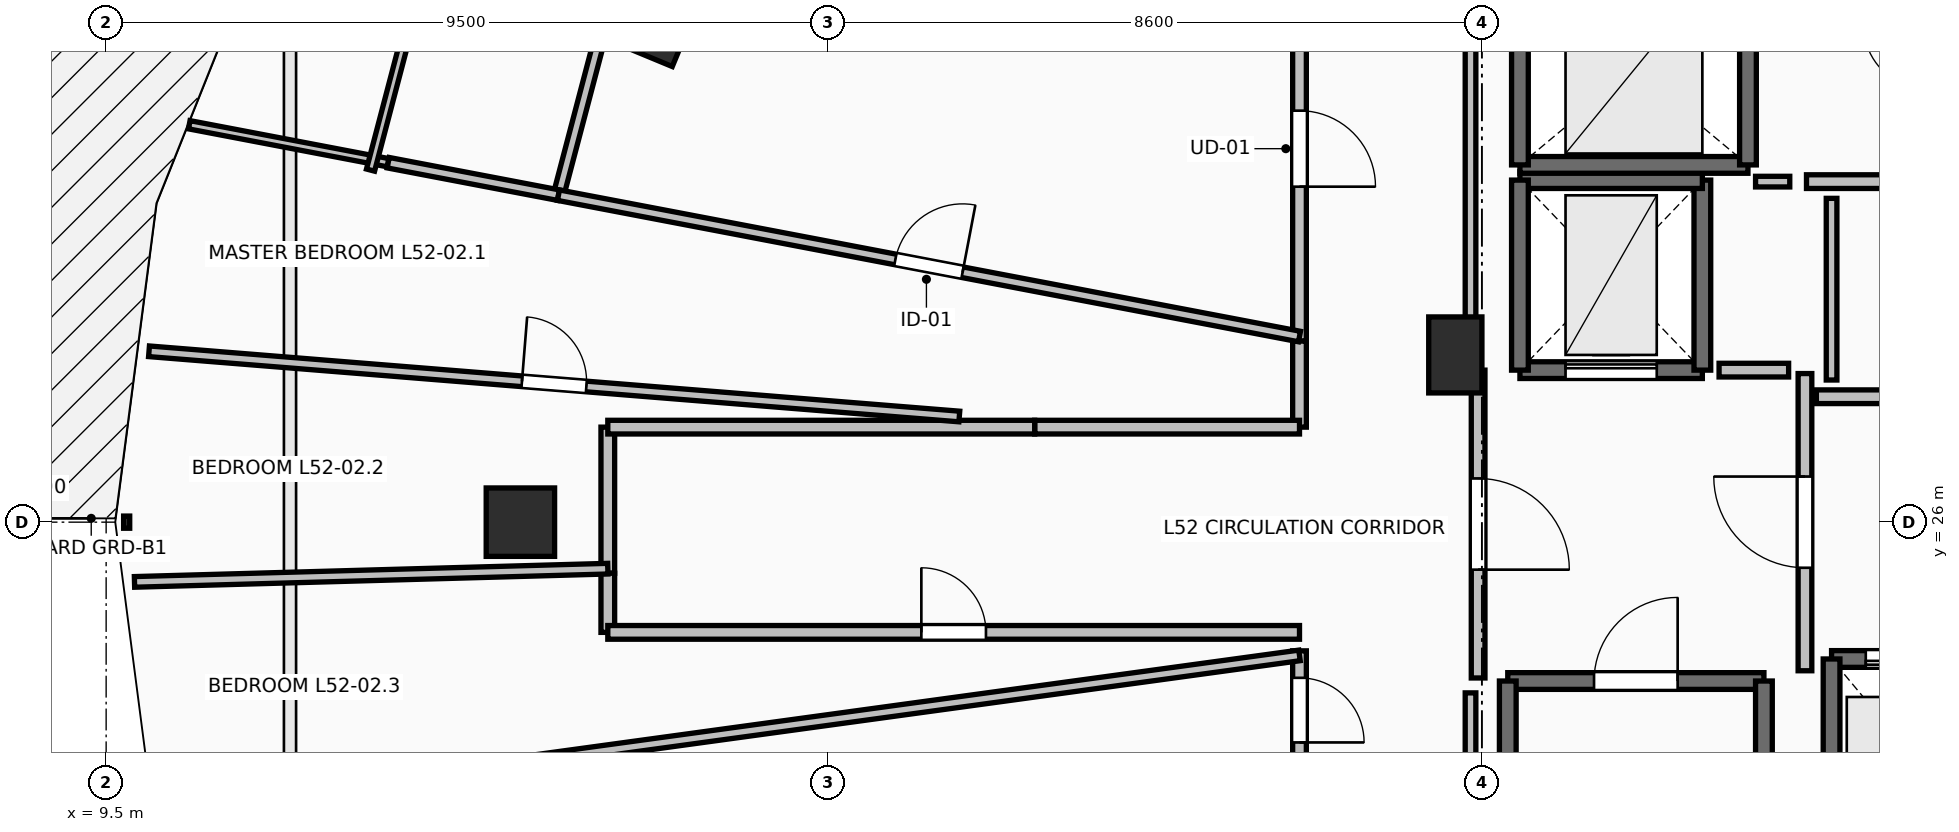
"""IFC4 building model, lengths in metres.
Left out: names, types, materials, properties, quantities, classifications, styles, units other than length and angle.
Written with IfcOpenShell. Run it as: python <this file> out.ifc"""

import sys

from ifc_helpers import new_model, si_unit, direction, frame, frame_2d, origin, origin_2d, place, context, subcontext, project, spatial, rectangle, extrude, element, fill, save


model = new_model("IFC4")
c1 = context("Model", 3, precision=1e-05, world=origin(), true_north=direction((0.0, 1.0)))
c2 = subcontext(c1, "Body", "Model", "MODEL_VIEW")
j1 = project(units=[si_unit("LENGTHUNIT", "METRE"), si_unit("PLANEANGLEUNIT", "RADIAN")], contexts=[c1])
p1 = place(None, origin())
s1 = spatial("IfcSite", under=j1, at=p1, CompositionType="ELEMENT")
p2 = place(p1, origin())
s2 = spatial("IfcBuilding", under=s1, at=p2, CompositionType="ELEMENT")
p3 = place(p2, frame((0.0, 0.0, 193.1)))
s3 = spatial("IfcBuildingStorey", under=s2, at=p3, CompositionType="ELEMENT", Elevation=193.1)
for number, where, z_axis, x_axis in (
    (1, (16.705, 32.582, 0.0), (0.0, 0.0, 1.0), (-0.924, 0.383, 0.0)),
    (2, (14.95, 26.0, 0.0), (0.0, 0.0, 1.0), (-1.0, 0.0, 0.0)),
):
    element("IfcColumn", number, at=place(p3, frame(where, z_axis=z_axis, x_axis=x_axis)), inside=s3, PredefinedType="COLUMN", context=c2, shape_type="SweptSolid", body=[
        extrude(rectangle(XDim=0.9, YDim=0.9, at=origin_2d()), origin(), (0.0, 0.0, 1.0), 3.5),
    ])
p4 = place(p3, frame((27.25, 28.2, 0.0), z_axis=(0.0, 0.0, 1.0), x_axis=(1.0, 0.0, 0.0)))
e3 = element("IfcColumn", 3, at=p4, inside=s3, PredefinedType="PILASTER", context=c2, shape_type="SweptSolid", body=[
    extrude(rectangle(XDim=0.7, YDim=1.0, at=origin_2d()), origin(), (0.0, 0.0, 1.0), 3.5),
])
p5 = place(p3, frame((27.94, 23.91, 0.0), z_axis=(0.0, 0.0, 1.0), x_axis=(1.0, 0.0, 0.0)))
e4 = element("IfcWall", 4, at=p5, inside=s3, PredefinedType="SOLIDWALL", context=c2, shape_type="SweptSolid", body=[
    extrude(rectangle(XDim=3.37, YDim=0.22, at=frame_2d((1.685, 0.0))), origin(), (0.0, 0.0, 1.0), 3.24),
])
p6 = place(p5, frame((1.135, 0.0, 0.0)))
e5 = element("IfcOpeningElement", 5, at=p6, cuts=e4, PredefinedType="OPENING", context=c2, shape_type="SweptSolid", body=[
    extrude(rectangle(XDim=1.1, YDim=2.15, at=frame_2d((0.55, 1.075))), frame((0.0, 0.125, 0.0), z_axis=(0.0, -1.0, 0.0), x_axis=(1.0, 0.0, 0.0)), (0.0, 0.0, 1.0), 0.25),
])
for number, where, z_axis, x_axis in (
    (6, (31.31, 23.91, 0.0), (0.0, 0.0, 1.0), (0.0, -1.0, 0.0)),
    (7, (27.94, 16.49, 0.0), (0.0, 0.0, 1.0), (0.0, 1.0, 0.0)),
):
    element("IfcWall", number, at=place(p3, frame(where, z_axis=z_axis, x_axis=x_axis)), inside=s3, PredefinedType="SOLIDWALL", context=c2, shape_type="SweptSolid", body=[
        extrude(rectangle(XDim=7.42, YDim=0.22, at=frame_2d((3.71, 0.0))), origin(), (0.0, 0.0, 1.0), 3.24),
    ])
p7 = place(p3, frame((34.2, 24.2, 0.0), z_axis=(0.0, 0.0, 1.0), x_axis=(-1.0, 0.0, 0.0)))
e8 = element("IfcWall", 8, at=p7, inside=s3, PredefinedType="SOLIDWALL", context=c2, shape_type="SweptSolid", body=[
    extrude(rectangle(XDim=2.0, YDim=0.22, at=frame_2d((1.0, 0.0))), origin(), (0.0, 0.0, 1.0), 3.24),
])
p8 = place(p7, frame((0.45, 0.0, 0.0)))
e9 = element("IfcOpeningElement", 9, at=p8, cuts=e8, PredefinedType="OPENING", context=c2, shape_type="SweptSolid", body=[
    extrude(rectangle(XDim=1.1, YDim=2.2, at=frame_2d((0.55, 1.1))), frame((0.0, 0.125, 0.0), z_axis=(0.0, -1.0, 0.0), x_axis=(1.0, 0.0, 0.0)), (0.0, 0.0, 1.0), 0.25),
])
p9 = place(p3, frame((32.2, 24.2, 0.0), z_axis=(0.0, 0.0, 1.0), x_axis=(0.0, -1.0, 0.0)))
e10 = element("IfcWall", 10, at=p9, inside=s3, PredefinedType="SOLIDWALL", context=c2, shape_type="SweptSolid", body=[
    extrude(rectangle(XDim=2.4, YDim=0.22, at=frame_2d((1.2, 0.0))), origin(), (0.0, 0.0, 1.0), 3.24),
])
p10 = place(p3, frame((28.1, 28.0, 0.0), z_axis=(0.0, 0.0, 1.0), x_axis=(1.0, 0.0, 0.0)))
e11 = element("IfcWall", 11, at=p10, inside=s3, PredefinedType="SHEAR", context=c2, shape_type="SweptSolid", body=[
    extrude(rectangle(XDim=2.4, YDim=0.22, at=frame_2d((1.2, 0.0))), origin(), (0.0, 0.0, 1.0), 3.24),
])
p11 = place(p10, frame((0.6, 0.0, 0.0)))
e12 = element("IfcOpeningElement", 12, at=p11, cuts=e11, PredefinedType="OPENING", context=c2, shape_type="SweptSolid", body=[
    extrude(rectangle(XDim=1.2, YDim=2.2, at=frame_2d((0.6, 1.1))), frame((0.0, 0.125, 0.0), z_axis=(0.0, -1.0, 0.0), x_axis=(1.0, 0.0, 0.0)), (0.0, 0.0, 1.0), 0.25),
])
p12 = place(p3, frame((30.5, 28.0, 0.0), z_axis=(0.0, 0.0, 1.0), x_axis=(0.0, 1.0, 0.0)))
e13 = element("IfcWall", 13, at=p12, inside=s3, PredefinedType="SHEAR", context=c2, shape_type="SweptSolid", body=[
    extrude(rectangle(XDim=2.5, YDim=0.22, at=frame_2d((1.25, 0.0))), origin(), (0.0, 0.0, 1.0), 3.24),
])
p13 = place(p3, frame((30.5, 30.5, 0.0), z_axis=(0.0, 0.0, 1.0), x_axis=(-1.0, 0.0, 0.0)))
e14 = element("IfcWall", 14, at=p13, inside=s3, PredefinedType="SHEAR", context=c2, shape_type="SweptSolid", body=[
    extrude(rectangle(XDim=2.4, YDim=0.22, at=frame_2d((1.2, 0.0))), origin(), (0.0, 0.0, 1.0), 3.24),
])
p14 = place(p3, frame((28.1, 30.5, 0.0), z_axis=(0.0, 0.0, 1.0), x_axis=(0.0, -1.0, 0.0)))
e15 = element("IfcWall", 15, at=p14, inside=s3, PredefinedType="SHEAR", context=c2, shape_type="SweptSolid", body=[
    extrude(rectangle(XDim=2.5, YDim=0.22, at=frame_2d((1.25, 0.0))), origin(), (0.0, 0.0, 1.0), 3.24),
])
p15 = place(p3, frame((28.1, 30.7, 0.0), z_axis=(0.0, 0.0, 1.0), x_axis=(1.0, 0.0, 0.0)))
e16 = element("IfcWall", 16, at=p15, inside=s3, PredefinedType="SOLIDWALL", context=c2, shape_type="SweptSolid", body=[
    extrude(rectangle(XDim=3.0, YDim=0.22, at=frame_2d((1.5, 0.0))), origin(), (0.0, 0.0, 1.0), 3.24),
])
for number, where, z_axis, x_axis in (
    (17, (31.1, 30.7, 0.0), (0.0, 0.0, 1.0), (0.0, 1.0, 0.0)),
    (18, (28.1, 33.2, 0.0), (0.0, 0.0, 1.0), (0.0, -1.0, 0.0)),
):
    element("IfcWall", number, at=place(p3, frame(where, z_axis=z_axis, x_axis=x_axis)), inside=s3, PredefinedType="SOLIDWALL", context=c2, shape_type="SweptSolid", body=[
        extrude(rectangle(XDim=2.5, YDim=0.22, at=frame_2d((1.25, 0.0))), origin(), (0.0, 0.0, 1.0), 3.24),
    ])
p16 = place(p3, frame((31.85, 24.045, 0.0), z_axis=(0.0, 0.0, 1.0), x_axis=(0.0, 1.0, 0.0)))
e19 = element("IfcWall", 19, at=p16, inside=s3, PredefinedType="PARTITIONING", context=c2, shape_type="SweptSolid", body=[
    extrude(rectangle(XDim=3.91, YDim=0.18, at=frame_2d((1.955, 0.0))), origin(), (0.0, 0.0, 1.0), 3.24),
])
p17 = place(p16, frame((1.355, 0.0, 0.0)))
e20 = element("IfcOpeningElement", 20, at=p17, cuts=e19, PredefinedType="OPENING", context=c2, shape_type="SweptSolid", body=[
    extrude(rectangle(XDim=1.2, YDim=2.15, at=frame_2d((0.6, 1.075))), frame((0.0, 0.105, 0.0), z_axis=(0.0, -1.0, 0.0), x_axis=(1.0, 0.0, 0.0)), (0.0, 0.0, 1.0), 0.21),
])
p18 = place(p3, frame((27.55, 28.0, 0.0), z_axis=(0.0, 0.0, 1.0), x_axis=(0.0, -1.0, 0.0)))
e21 = element("IfcWall", 21, at=p18, inside=s3, PredefinedType="PARTITIONING", context=c2, shape_type="SweptSolid", body=[
    extrude(rectangle(XDim=4.05, YDim=0.18, at=frame_2d((2.025, 0.0))), origin(), (0.0, 0.0, 1.0), 3.24),
])
p19 = place(p18, frame((1.425, 0.0, 0.0)))
e22 = element("IfcOpeningElement", 22, at=p19, cuts=e21, PredefinedType="OPENING", context=c2, shape_type="SweptSolid", body=[
    extrude(rectangle(XDim=1.2, YDim=2.15, at=frame_2d((0.6, 1.075))), frame((0.0, 0.105, 0.0), z_axis=(0.0, -1.0, 0.0), x_axis=(1.0, 0.0, 0.0)), (0.0, 0.0, 1.0), 0.21),
])
p20 = place(p3, frame((31.87, 30.48, 0.0), z_axis=(0.0, 0.0, 1.0), x_axis=(1.0, 0.0, 0.0)))
e23 = element("IfcWall", 23, at=p20, inside=s3, PredefinedType="PARTITIONING", context=c2, shape_type="SweptSolid", body=[
    extrude(rectangle(XDim=1.6, YDim=0.18, at=frame_2d((0.8, 0.0))), origin(), (0.0, 0.0, 1.0), 3.24),
])
p21 = place(p3, frame((39.19, 27.65, 0.0), z_axis=(0.0, 0.0, 1.0), x_axis=(-1.0, 0.0, 0.0)))
e24 = element("IfcWall", 24, at=p21, inside=s3, PredefinedType="PARTITIONING", context=c2, shape_type="SweptSolid", body=[
    extrude(rectangle(XDim=7.19, YDim=0.18, at=frame_2d((3.595, 0.0))), origin(), (0.0, 0.0, 1.0), 3.24),
])
p22 = place(p21, frame((3.095, 0.0, 0.0)))
e25 = element("IfcOpeningElement", 25, at=p22, cuts=e24, PredefinedType="OPENING", context=c2, shape_type="SweptSolid", body=[
    extrude(rectangle(XDim=1.0, YDim=2.15, at=frame_2d((0.5, 1.075))), frame((0.0, 0.105, 0.0), z_axis=(0.0, -1.0, 0.0), x_axis=(1.0, 0.0, 0.0)), (0.0, 0.0, 1.0), 0.21),
])
p23 = place(p3, frame((25.2, 33.445, 0.0), z_axis=(0.0, 0.0, 1.0), x_axis=(0.0, -1.0, 0.0)))
e26 = element("IfcWall", 26, at=p23, inside=s3, PredefinedType="PARTITIONING", context=c2, shape_type="SweptSolid", body=[
    extrude(rectangle(XDim=5.063, YDim=0.18, at=frame_2d((2.531, 0.0))), origin(), (0.0, 0.0, 1.0), 2.432),
])
p24 = place(p23, frame((2.031, 0.0, 0.0)))
e27 = element("IfcOpeningElement", 27, at=p24, cuts=e26, PredefinedType="OPENING", context=c2, shape_type="SweptSolid", body=[
    extrude(rectangle(XDim=1.0, YDim=2.15, at=frame_2d((0.5, 1.075))), frame((0.0, 0.105, 0.0), z_axis=(0.0, -1.0, 0.0), x_axis=(1.0, 0.0, 0.0)), (0.0, 0.0, 1.0), 0.21),
])
p25 = place(p3, frame((25.2, 28.382, 0.0), z_axis=(0.0, 0.0, 1.0), x_axis=(0.0, -1.0, 0.0)))
e28 = element("IfcWall", 28, at=p25, inside=s3, PredefinedType="PARTITIONING", context=c2, shape_type="SweptSolid", body=[
    extrude(rectangle(XDim=1.132, YDim=0.18, at=frame_2d((0.566, 0.0))), origin(), (0.0, 0.0, 1.0), 2.432),
])
p26 = place(p3, frame((25.2, 27.25, 0.0), z_axis=(0.0, 0.0, 1.0), x_axis=(-1.0, 0.0, 0.0)))
e29 = element("IfcWall", 29, at=p26, inside=s3, PredefinedType="PARTITIONING", context=c2, shape_type="SweptSolid", body=[
    extrude(rectangle(XDim=3.484, YDim=0.18, at=frame_2d((1.742, 0.0))), origin(), (0.0, 0.0, 1.0), 2.432),
])
p27 = place(p3, frame((16.1, 27.25, 0.0), z_axis=(0.0, 0.0, 1.0), x_axis=(0.0, -1.0, 0.0)))
e30 = element("IfcWall", 30, at=p27, inside=s3, PredefinedType="PARTITIONING", context=c2, shape_type="SweptSolid", body=[
    extrude(rectangle(XDim=1.922, YDim=0.18, at=frame_2d((0.961, 0.0))), origin(), (0.0, 0.0, 1.0), 2.432),
])
p28 = place(p3, frame((21.716, 27.25, 0.0), z_axis=(0.0, 0.0, 1.0), x_axis=(-1.0, 0.0, 0.0)))
e31 = element("IfcWall", 31, at=p28, inside=s3, PredefinedType="PARTITIONING", context=c2, shape_type="SweptSolid", body=[
    extrude(rectangle(XDim=5.616, YDim=0.18, at=frame_2d((2.808, 0.0))), origin(), (0.0, 0.0, 1.0), 2.432),
])
p29 = place(p3, frame((16.1, 25.328, 0.0), z_axis=(0.0, 0.0, 1.0), x_axis=(0.0, -1.0, 0.0)))
e32 = element("IfcWall", 32, at=p29, inside=s3, PredefinedType="PARTITIONING", context=c2, shape_type="SweptSolid", body=[
    extrude(rectangle(XDim=0.778, YDim=0.18, at=frame_2d((0.389, 0.0))), origin(), (0.0, 0.0, 1.0), 3.24),
])
p30 = place(p3, frame((16.1, 24.55, 0.0), z_axis=(0.0, 0.0, 1.0), x_axis=(1.0, 0.0, 0.0)))
e33 = element("IfcWall", 33, at=p30, inside=s3, PredefinedType="PARTITIONING", context=c2, shape_type="SweptSolid", body=[
    extrude(rectangle(XDim=9.1, YDim=0.18, at=frame_2d((4.55, 0.0))), origin(), (0.0, 0.0, 1.0), 2.922),
])
p31 = place(p30, frame((4.125, 0.0, 0.0)))
e34 = element("IfcOpeningElement", 34, at=p31, cuts=e33, PredefinedType="OPENING", context=c2, shape_type="SweptSolid", body=[
    extrude(rectangle(XDim=0.85, YDim=2.1, at=frame_2d((0.425, 1.05))), frame((0.0, 0.105, 0.0), z_axis=(0.0, -1.0, 0.0), x_axis=(1.0, 0.0, 0.0)), (0.0, 0.0, 1.0), 0.21),
])
p32 = place(p3, frame((25.2, 24.307, 0.0), z_axis=(0.0, 0.0, 1.0), x_axis=(0.0, -1.0, 0.0)))
e35 = element("IfcWall", 35, at=p32, inside=s3, PredefinedType="PARTITIONING", context=c2, shape_type="SweptSolid", body=[
    extrude(rectangle(XDim=1.56, YDim=0.18, at=frame_2d((0.78, 0.0))), origin(), (0.0, 0.0, 1.0), 3.24),
])
p33 = place(p32, frame((0.355, 0.0, 0.0)))
e36 = element("IfcOpeningElement", 36, at=p33, cuts=e35, PredefinedType="OPENING", context=c2, shape_type="SweptSolid", body=[
    extrude(rectangle(XDim=0.85, YDim=2.1, at=frame_2d((0.425, 1.05))), frame((0.0, 0.105, 0.0), z_axis=(0.0, -1.0, 0.0), x_axis=(1.0, 0.0, 0.0)), (0.0, 0.0, 1.0), 0.21),
])
p34 = place(p3, frame((13.21, 30.729, 0.0), z_axis=(0.0, 0.0, 1.0), x_axis=(-0.982266305937, 0.187491077708, 0.0)))
e37 = element("IfcWall", 37, at=p34, inside=s3, PredefinedType="PARTITIONING", context=c2, shape_type="SweptSolid", body=[
    extrude(rectangle(XDim=2.664, YDim=0.11, at=frame_2d((1.332, 0.0))), origin(), (0.0, 0.0, 1.0), 3.24),
])
p35 = place(p3, frame((16.123, 32.853, 0.0), z_axis=(0.0, 0.0, 1.0), x_axis=(-0.254775717765, -0.967000172512, 0.0)))
e38 = element("IfcWall", 38, at=p35, inside=s3, PredefinedType="PARTITIONING", context=c2, shape_type="SweptSolid", body=[
    extrude(rectangle(XDim=2.638, YDim=0.14, at=frame_2d((1.319, 0.0))), origin(), (0.0, 0.0, 1.0), 3.24),
])
p36 = place(p3, frame((15.451, 30.302, 0.0), z_axis=(0.0, 0.0, 1.0), x_axis=(-0.982295439063, 0.187338384738, 0.0)))
e39 = element("IfcWall", 39, at=p36, inside=s3, PredefinedType="PARTITIONING", context=c2, shape_type="SweptSolid", body=[
    extrude(rectangle(XDim=2.281, YDim=0.14, at=frame_2d((1.14, 0.0))), origin(), (0.0, 0.0, 1.0), 3.24),
])
p37 = place(p3, frame((15.451, 30.302, 0.0), z_axis=(0.0, 0.0, 1.0), x_axis=(0.982284698783, -0.187394691859, 0.0)))
e40 = element("IfcWall", 40, at=p37, inside=s3, PredefinedType="PARTITIONING", context=c2, shape_type="SweptSolid", body=[
    extrude(rectangle(XDim=9.925, YDim=0.14, at=frame_2d((4.962, 0.0))), origin(), (0.0, 0.0, 1.0), 2.774),
])
p38 = place(p37, frame((4.512, 0.0, 0.0)))
e41 = element("IfcOpeningElement", 41, at=p38, cuts=e40, PredefinedType="OPENING", context=c2, shape_type="SweptSolid", body=[
    extrude(rectangle(XDim=0.9, YDim=2.1, at=frame_2d((0.45, 1.05))), frame((0.0, 0.085, 0.0), z_axis=(0.0, -1.0, 0.0), x_axis=(1.0, 0.0, 0.0)), (0.0, 0.0, 1.0), 0.17),
])
p39 = place(p3, frame((12.979, 30.632, 0.0), z_axis=(0.0, 0.0, 1.0), x_axis=(0.254121849718, 0.967172210879, 0.0)))
e42 = element("IfcWall", 42, at=p39, inside=s3, PredefinedType="PARTITIONING", context=c2, shape_type="SweptSolid", body=[
    extrude(rectangle(XDim=3.203, YDim=0.11, at=frame_2d((1.602, 0.0))), origin(), (0.0, 0.0, 1.0), 3.24),
])
p40 = place(p3, frame((10.064, 28.248, 0.0), z_axis=(0.0, 0.0, 1.0), x_axis=(0.996775744362, -0.080237867939, 0.0)))
e43 = element("IfcWall", 43, at=p40, inside=s3, PredefinedType="PARTITIONING", context=c2, shape_type="SweptSolid", body=[
    extrude(rectangle(XDim=10.695, YDim=0.14, at=frame_2d((5.348, 0.0))), origin(), (0.0, 0.0, 1.0), 2.774),
])
p41 = place(p40, frame((4.923, 0.0, 0.0)))
e44 = element("IfcOpeningElement", 44, at=p41, cuts=e43, PredefinedType="OPENING", context=c2, shape_type="SweptSolid", body=[
    extrude(rectangle(XDim=0.85, YDim=2.1, at=frame_2d((0.425, 1.05))), frame((0.0, 0.085, 0.0), z_axis=(0.0, -1.0, 0.0), x_axis=(1.0, 0.0, 0.0)), (0.0, 0.0, 1.0), 0.17),
])
p42 = place(p3, frame((9.873, 25.214, 0.0), z_axis=(0.0, 0.0, 1.0), x_axis=(0.999610603939, 0.027904130401, 0.0)))
e45 = element("IfcWall", 45, at=p42, inside=s3, PredefinedType="PARTITIONING", context=c2, shape_type="SweptSolid", body=[
    extrude(rectangle(XDim=6.229, YDim=0.14, at=frame_2d((3.115, 0.0))), origin(), (0.0, 0.0, 1.0), 2.774),
])
p43 = place(p3, frame((10.266, 22.201, 0.0), z_axis=(0.0, 0.0, 1.0), x_axis=(0.990743725495, 0.135745609106, 0.0)))
e46 = element("IfcWall", 46, at=p43, inside=s3, PredefinedType="PARTITIONING", context=c2, shape_type="SweptSolid", body=[
    extrude(rectangle(XDim=15.073, YDim=0.14, at=frame_2d((7.537, 0.0))), origin(), (0.0, 0.0, 1.0), 2.774),
])
p44 = place(p3, frame((31.635, 28.0, 0.0), z_axis=(0.0, 0.0, 1.0), x_axis=(-1.0, 0.0, 0.0)))
e47 = element("IfcWall", 47, at=p44, inside=s3, PredefinedType="PARTITIONING", context=c2, shape_type="SweptSolid", body=[
    extrude(rectangle(XDim=0.915, YDim=0.18, at=frame_2d((0.458, 0.0))), origin(), (0.0, 0.0, 1.0), 3.24),
])
p45 = place(p3, frame((31.2, 30.48, 0.0), z_axis=(0.0, 0.0, 1.0), x_axis=(1.0, 0.0, 0.0)))
e48 = element("IfcWall", 48, at=p45, inside=s3, PredefinedType="PARTITIONING", context=c2, shape_type="SweptSolid", body=[
    extrude(rectangle(XDim=0.45, YDim=0.14, at=frame_2d((0.225, 0.0))), origin(), (0.0, 0.0, 1.0), 3.24),
])
p46 = place(p3, frame((32.2, 30.26, 0.0), z_axis=(0.0, 0.0, 1.0), x_axis=(0.0, -1.0, 0.0)))
e49 = element("IfcWall", 49, at=p46, inside=s3, PredefinedType="PARTITIONING", context=c2, shape_type="SweptSolid", body=[
    extrude(rectangle(XDim=2.39, YDim=0.14, at=frame_2d((1.195, 0.0))), origin(), (0.0, 0.0, 1.0), 3.24),
])
p47 = place(p3, frame((27.45, 33.45, 0.0), z_axis=(0.0, 0.0, 1.0), x_axis=(0.0, -1.0, 0.0)))
e50 = element("IfcWall", 50, at=p47, inside=s3, PredefinedType="PARTITIONING", context=c2, shape_type="SweptSolid", body=[
    extrude(rectangle(XDim=5.254, YDim=0.14, at=frame_2d((2.627, 0.0))), origin(), (0.0, 0.0, 1.0), 2.432),
])
p48 = place(p3, frame((27.45, 23.754, 0.0), z_axis=(0.0, 0.0, 1.0), x_axis=(0.0, -1.0, 0.0)))
e51 = element("IfcWall", 51, at=p48, inside=s3, PredefinedType="PARTITIONING", context=c2, shape_type="SweptSolid", body=[
    extrude(rectangle(XDim=7.514, YDim=0.14, at=frame_2d((3.757, 0.0))), origin(), (0.0, 0.0, 1.0), 2.432),
])
p49 = place(p6, origin())
e52 = element("IfcDoor", 52, at=p49, inside=s3, OperationType="SINGLE_SWING_RIGHT", PredefinedType="DOOR", context=c2, shape_type="SweptSolid", body=[
    extrude(rectangle(XDim=1.1, YDim=2.15, at=frame_2d((0.55, 1.075))), frame((0.0, 0.025, 0.0), z_axis=(0.0, -1.0, 0.0), x_axis=(1.0, 0.0, 0.0)), (0.0, 0.0, 1.0), 0.05),
])
fill(e5, e52)
p50 = place(p8, origin())
e53 = element("IfcDoor", 53, at=p50, inside=s3, OperationType="SLIDING_TO_LEFT", PredefinedType="DOOR", context=c2, shape_type="SweptSolid", body=[
    extrude(rectangle(XDim=1.1, YDim=2.2, at=frame_2d((0.55, 1.1))), frame((0.0, 0.025, 0.0), z_axis=(0.0, -1.0, 0.0), x_axis=(1.0, 0.0, 0.0)), (0.0, 0.0, 1.0), 0.05),
])
fill(e9, e53)
p51 = place(p11, origin())
e54 = element("IfcDoor", 54, at=p51, inside=s3, OperationType="SLIDING_TO_LEFT", PredefinedType="DOOR", context=c2, shape_type="SweptSolid", body=[
    extrude(rectangle(XDim=1.2, YDim=2.2, at=frame_2d((0.6, 1.1))), frame((0.0, 0.025, 0.0), z_axis=(0.0, -1.0, 0.0), x_axis=(1.0, 0.0, 0.0)), (0.0, 0.0, 1.0), 0.05),
])
fill(e12, e54)
p52 = place(p17, origin())
e55 = element("IfcDoor", 55, at=p52, inside=s3, OperationType="SINGLE_SWING_RIGHT", PredefinedType="DOOR", context=c2, shape_type="SweptSolid", body=[
    extrude(rectangle(XDim=1.2, YDim=2.15, at=frame_2d((0.6, 1.075))), frame((0.0, 0.025, 0.0), z_axis=(0.0, -1.0, 0.0), x_axis=(1.0, 0.0, 0.0)), (0.0, 0.0, 1.0), 0.05),
])
fill(e20, e55)
p53 = place(p19, origin())
e56 = element("IfcDoor", 56, at=p53, inside=s3, OperationType="SINGLE_SWING_RIGHT", PredefinedType="DOOR", context=c2, shape_type="SweptSolid", body=[
    extrude(rectangle(XDim=1.2, YDim=2.15, at=frame_2d((0.6, 1.075))), frame((0.0, 0.025, 0.0), z_axis=(0.0, -1.0, 0.0), x_axis=(1.0, 0.0, 0.0)), (0.0, 0.0, 1.0), 0.05),
])
fill(e22, e56)
p54 = place(p24, origin())
e57 = element("IfcDoor", 57, at=p54, inside=s3, OperationType="SINGLE_SWING_RIGHT", PredefinedType="DOOR", context=c2, shape_type="SweptSolid", body=[
    extrude(rectangle(XDim=1.0, YDim=2.15, at=frame_2d((0.5, 1.075))), frame((0.0, 0.025, 0.0), z_axis=(0.0, -1.0, 0.0), x_axis=(1.0, 0.0, 0.0)), (0.0, 0.0, 1.0), 0.05),
])
fill(e27, e57)
p55 = place(p38, origin())
e58 = element("IfcDoor", 58, at=p55, inside=s3, OperationType="SINGLE_SWING_RIGHT", PredefinedType="DOOR", context=c2, shape_type="SweptSolid", body=[
    extrude(rectangle(XDim=0.9, YDim=2.1, at=frame_2d((0.45, 1.05))), frame((0.0, 0.025, 0.0), z_axis=(0.0, -1.0, 0.0), x_axis=(1.0, 0.0, 0.0)), (0.0, 0.0, 1.0), 0.05),
])
fill(e41, e58)
p56 = place(p31, origin())
e59 = element("IfcDoor", 59, at=p56, inside=s3, OperationType="SINGLE_SWING_LEFT", PredefinedType="DOOR", context=c2, shape_type="SweptSolid", body=[
    extrude(rectangle(XDim=0.85, YDim=2.1, at=frame_2d((0.425, 1.05))), frame((0.0, 0.025, 0.0), z_axis=(0.0, -1.0, 0.0), x_axis=(1.0, 0.0, 0.0)), (0.0, 0.0, 1.0), 0.05),
])
fill(e34, e59)
p57 = place(p33, origin())
e60 = element("IfcDoor", 60, at=p57, inside=s3, OperationType="SINGLE_SWING_RIGHT", PredefinedType="DOOR", context=c2, shape_type="SweptSolid", body=[
    extrude(rectangle(XDim=0.85, YDim=2.1, at=frame_2d((0.425, 1.05))), frame((0.0, 0.025, 0.0), z_axis=(0.0, -1.0, 0.0), x_axis=(1.0, 0.0, 0.0)), (0.0, 0.0, 1.0), 0.05),
])
fill(e36, e60)
p58 = place(p41, origin())
e61 = element("IfcDoor", 61, at=p58, inside=s3, OperationType="SINGLE_SWING_LEFT", PredefinedType="DOOR", context=c2, shape_type="SweptSolid", body=[
    extrude(rectangle(XDim=0.85, YDim=2.1, at=frame_2d((0.425, 1.05))), frame((0.0, 0.025, 0.0), z_axis=(0.0, -1.0, 0.0), x_axis=(1.0, 0.0, 0.0)), (0.0, 0.0, 1.0), 0.05),
])
fill(e44, e61)
save(model, sys.argv[1])
